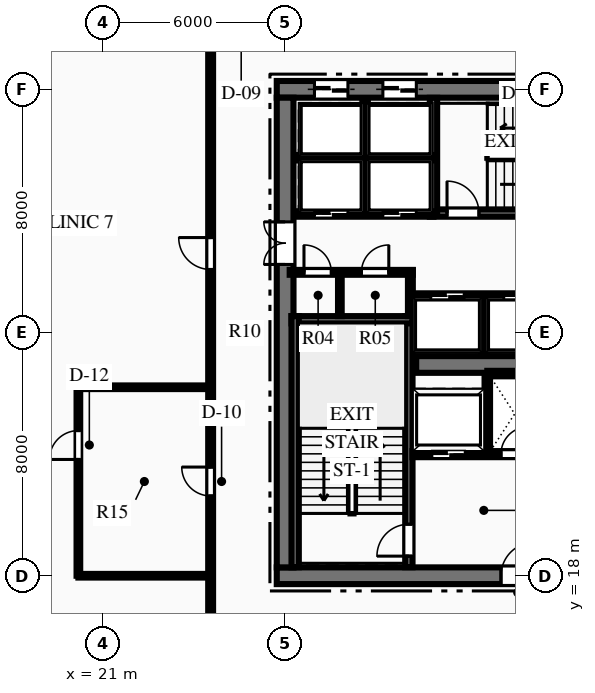
"""IFC4 building model, lengths in metres.
Left out: names, types, materials, properties, quantities, classifications, styles, units other than length and angle.
Written with IfcOpenShell. Run it as: python <this file> out.ifc"""

import sys

from ifc_helpers import new_model, si_unit, direction, frame, frame_2d, origin, place, context, subcontext, project, spatial, rectangle, extrude, element, fill, save


model = new_model("IFC4")
c1 = context("Model", 3, precision=1e-05, world=origin(), true_north=direction((0.0, 1.0)))
c2 = subcontext(c1, "Body", "Model", "MODEL_VIEW")
j1 = project(units=[si_unit("LENGTHUNIT", "METRE"), si_unit("PLANEANGLEUNIT", "RADIAN")], contexts=[c1])
p1 = place(None, origin())
s1 = spatial("IfcSite", under=j1, at=p1, CompositionType="ELEMENT")
p2 = place(p1, origin())
s2 = spatial("IfcBuilding", under=s1, at=p2, CompositionType="ELEMENT")
p3 = place(p2, frame((0.0, 0.0, 90.45)))
s3 = spatial("IfcBuildingStorey", under=s2, at=p3, CompositionType="ELEMENT", Elevation=90.45)
p4 = place(p3, frame((26.725, 18.0, 0.0), z_axis=(0.0, 0.0, 1.0), x_axis=(1.0, 0.0, 0.0)))
e1 = element("IfcWall", 1, at=p4, inside=s3, PredefinedType="SHEAR", context=c2, shape_type="SweptSolid", body=[
    extrude(rectangle(XDim=18.55, YDim=0.55, at=frame_2d((9.275, 0.0))), origin(), (0.0, 0.0, 1.0), 3.75),
])
p5 = place(p4, frame((7.375, 0.0, 0.0)))
e2 = element("IfcOpeningElement", 2, at=p5, cuts=e1, PredefinedType="OPENING", context=c2, shape_type="SweptSolid", body=[
    extrude(rectangle(XDim=1.1, YDim=2.15, at=frame_2d((0.55, 1.075))), frame((0.0, 0.285, 0.0), z_axis=(0.0, -1.0, 0.0), x_axis=(1.0, 0.0, 0.0)), (0.0, 0.0, 1.0), 0.57),
])
p6 = place(p4, frame((10.075, 0.0, 0.0)))
e3 = element("IfcOpeningElement", 3, at=p6, cuts=e1, PredefinedType="OPENING", context=c2, shape_type="SweptSolid", body=[
    extrude(rectangle(XDim=1.1, YDim=2.15, at=frame_2d((0.55, 1.075))), frame((0.0, 0.285, 0.0), z_axis=(0.0, -1.0, 0.0), x_axis=(1.0, 0.0, 0.0)), (0.0, 0.0, 1.0), 0.57),
])
p7 = place(p3, frame((26.725, 34.0, 0.0), z_axis=(0.0, 0.0, 1.0), x_axis=(1.0, 0.0, 0.0)))
e4 = element("IfcWall", 4, at=p7, inside=s3, PredefinedType="SHEAR", context=c2, shape_type="SweptSolid", body=[
    extrude(rectangle(XDim=18.55, YDim=0.55, at=frame_2d((9.275, 0.0))), origin(), (0.0, 0.0, 1.0), 3.75),
])
p8 = place(p7, frame((1.24, 0.0, 0.0)))
e5 = element("IfcOpeningElement", 5, at=p8, cuts=e4, PredefinedType="OPENING", context=c2, shape_type="SweptSolid", body=[
    extrude(rectangle(XDim=1.1, YDim=2.15, at=frame_2d((0.55, 1.075))), frame((0.0, 0.285, 0.0), z_axis=(0.0, -1.0, 0.0), x_axis=(1.0, 0.0, 0.0)), (0.0, 0.0, 1.0), 0.57),
])
p9 = place(p7, frame((3.49, 0.0, 0.0)))
e6 = element("IfcOpeningElement", 6, at=p9, cuts=e4, PredefinedType="OPENING", context=c2, shape_type="SweptSolid", body=[
    extrude(rectangle(XDim=1.1, YDim=2.15, at=frame_2d((0.55, 1.075))), frame((0.0, 0.285, 0.0), z_axis=(0.0, -1.0, 0.0), x_axis=(1.0, 0.0, 0.0)), (0.0, 0.0, 1.0), 0.57),
])
p10 = place(p7, frame((13.96, 0.0, 0.0)))
e7 = element("IfcOpeningElement", 7, at=p10, cuts=e4, PredefinedType="OPENING", context=c2, shape_type="SweptSolid", body=[
    extrude(rectangle(XDim=1.1, YDim=2.15, at=frame_2d((0.55, 1.075))), frame((0.0, 0.285, 0.0), z_axis=(0.0, -1.0, 0.0), x_axis=(1.0, 0.0, 0.0)), (0.0, 0.0, 1.0), 0.57),
])
p11 = place(p7, frame((16.21, 0.0, 0.0)))
e8 = element("IfcOpeningElement", 8, at=p11, cuts=e4, PredefinedType="OPENING", context=c2, shape_type="SweptSolid", body=[
    extrude(rectangle(XDim=1.1, YDim=2.15, at=frame_2d((0.55, 1.075))), frame((0.0, 0.285, 0.0), z_axis=(0.0, -1.0, 0.0), x_axis=(1.0, 0.0, 0.0)), (0.0, 0.0, 1.0), 0.57),
])
p12 = place(p3, frame((27.0, 18.275, 0.0), z_axis=(0.0, 0.0, 1.0), x_axis=(0.0, 1.0, 0.0)))
e9 = element("IfcWall", 9, at=p12, inside=s3, PredefinedType="SHEAR", context=c2, shape_type="SweptSolid", body=[
    extrude(rectangle(XDim=15.45, YDim=0.55, at=frame_2d((7.725, 0.0))), origin(), (0.0, 0.0, 1.0), 3.75),
])
p13 = place(p12, frame((9.965, 0.0, 0.0)))
e10 = element("IfcOpeningElement", 10, at=p13, cuts=e9, PredefinedType="OPENING", context=c2, shape_type="SweptSolid", body=[
    extrude(rectangle(XDim=1.4, YDim=2.2, at=frame_2d((0.7, 1.1))), frame((0.0, 0.285, 0.0), z_axis=(0.0, -1.0, 0.0), x_axis=(1.0, 0.0, 0.0)), (0.0, 0.0, 1.0), 0.57),
])
p14 = place(p3, frame((31.31, 24.95, 0.0), z_axis=(0.0, 0.0, 1.0), x_axis=(1.0, 0.0, 0.0)))
e11 = element("IfcWall", 11, at=p14, inside=s3, PredefinedType="SHEAR", context=c2, shape_type="SweptSolid", body=[
    extrude(rectangle(XDim=9.38, YDim=0.55, at=frame_2d((4.69, 0.0))), origin(), (0.0, 0.0, 1.0), 3.75),
])
p15 = place(p3, frame((31.07, 18.28, 0.0), z_axis=(0.0, 0.0, 1.0), x_axis=(0.0, 1.0, 0.0)))
e12 = element("IfcWall", 12, at=p15, inside=s3, PredefinedType="SHEAR", context=c2, shape_type="SweptSolid", body=[
    extrude(rectangle(XDim=8.26, YDim=0.24, at=frame_2d((4.13, 0.0))), origin(), (0.0, 0.0, 1.0), 3.75),
])
p16 = place(p15, frame((0.365, 0.0, 0.0)))
e13 = element("IfcOpeningElement", 13, at=p16, cuts=e12, PredefinedType="OPENING", context=c2, shape_type="SweptSolid", body=[
    extrude(rectangle(XDim=1.05, YDim=2.15, at=frame_2d((0.525, 1.075))), frame((0.0, 0.13, 0.0), z_axis=(0.0, -1.0, 0.0), x_axis=(1.0, 0.0, 0.0)), (0.0, 0.0, 1.0), 0.26),
])
p17 = place(p3, frame((27.21, 26.42, 0.0), z_axis=(0.0, 0.0, 1.0), x_axis=(1.0, 0.0, 0.0)))
e14 = element("IfcWall", 14, at=p17, inside=s3, PredefinedType="SHEAR", context=c2, shape_type="SweptSolid", body=[
    extrude(rectangle(XDim=3.98, YDim=0.24, at=frame_2d((1.99, 0.0))), origin(), (0.0, 0.0, 1.0), 3.75),
])
p18 = place(p3, frame((27.33, 18.28, 0.0), z_axis=(0.0, 0.0, 1.0), x_axis=(0.0, 1.0, 0.0)))
e15 = element("IfcWall", 15, at=p18, inside=s3, PredefinedType="SHEAR", context=c2, shape_type="SweptSolid", body=[
    extrude(rectangle(XDim=8.26, YDim=0.24, at=frame_2d((4.13, 0.0))), origin(), (0.0, 0.0, 1.0), 3.75),
])
p19 = place(p3, frame((31.76, 29.93, 0.0), z_axis=(0.0, 0.0, 1.0), x_axis=(1.0, 0.0, 0.0)))
e16 = element("IfcWall", 16, at=p19, inside=s3, PredefinedType="SHEAR", context=c2, shape_type="SweptSolid", body=[
    extrude(rectangle(XDim=8.38, YDim=0.24, at=frame_2d((4.19, 0.0))), origin(), (0.0, 0.0, 1.0), 3.75),
])
p20 = place(p19, frame((0.565, 0.0, 0.0)))
e17 = element("IfcOpeningElement", 17, at=p20, cuts=e16, PredefinedType="OPENING", context=c2, shape_type="SweptSolid", body=[
    extrude(rectangle(XDim=1.05, YDim=2.15, at=frame_2d((0.525, 1.075))), frame((0.0, 0.13, 0.0), z_axis=(0.0, -1.0, 0.0), x_axis=(1.0, 0.0, 0.0)), (0.0, 0.0, 1.0), 0.26),
])
p21 = place(p3, frame((31.88, 29.93, 0.0), z_axis=(0.0, 0.0, 1.0), x_axis=(0.0, 1.0, 0.0)))
e18 = element("IfcWall", 18, at=p21, inside=s3, PredefinedType="SHEAR", context=c2, shape_type="SweptSolid", body=[
    extrude(rectangle(XDim=3.79, YDim=0.24, at=frame_2d((1.895, 0.0))), origin(), (0.0, 0.0, 1.0), 3.75),
])
p22 = place(p3, frame((31.19, 22.0, 0.0), z_axis=(0.0, 0.0, 1.0), x_axis=(1.0, 0.0, 0.0)))
e19 = element("IfcWall", 19, at=p22, inside=s3, PredefinedType="PARTITIONING", context=c2, shape_type="SweptSolid", body=[
    extrude(rectangle(XDim=4.69, YDim=0.2, at=frame_2d((2.345, 0.0))), origin(), (0.0, 0.0, 1.0), 3.45),
])
p23 = place(p22, frame((2.91, 0.0, 0.0)))
e20 = element("IfcOpeningElement", 20, at=p23, cuts=e19, PredefinedType="OPENING", context=c2, shape_type="SweptSolid", body=[
    extrude(rectangle(XDim=0.9, YDim=2.15, at=frame_2d((0.45, 1.075))), frame((0.0, 0.11, 0.0), z_axis=(0.0, -1.0, 0.0), x_axis=(1.0, 0.0, 0.0)), (0.0, 0.0, 1.0), 0.22),
])
p24 = place(p22, frame((0.635, 0.0, 0.0)))
e21 = element("IfcOpeningElement", 21, at=p24, cuts=e19, PredefinedType="OPENING", context=c2, shape_type="SweptSolid", body=[
    extrude(rectangle(XDim=1.1, YDim=2.15, at=frame_2d((0.55, 1.075))), frame((0.0, 0.11, 0.0), z_axis=(0.0, -1.0, 0.0), x_axis=(1.0, 0.0, 0.0)), (0.0, 0.0, 1.0), 0.22),
])
p25 = place(p3, frame((33.65, 22.05, 0.0), z_axis=(0.0, 0.0, 1.0), x_axis=(0.0, 1.0, 0.0)))
e22 = element("IfcWall", 22, at=p25, inside=s3, PredefinedType="PARTITIONING", context=c2, shape_type="SweptSolid", body=[
    extrude(rectangle(XDim=2.6, YDim=0.18, at=frame_2d((1.3, 0.0))), origin(), (0.0, 0.0, 1.0), 3.45),
])
p26 = place(p3, frame((33.65, 24.65, 0.0), z_axis=(0.0, 0.0, 1.0), x_axis=(1.0, 0.0, 0.0)))
e23 = element("IfcWall", 23, at=p26, inside=s3, PredefinedType="PARTITIONING", context=c2, shape_type="SweptSolid", body=[
    extrude(rectangle(XDim=1.8, YDim=0.18, at=frame_2d((0.9, 0.0))), origin(), (0.0, 0.0, 1.0), 3.45),
])
p27 = place(p3, frame((27.15, 27.98, 0.0), z_axis=(0.0, 0.0, 1.0), x_axis=(1.0, 0.0, 0.0)))
e24 = element("IfcWall", 24, at=p27, inside=s3, PredefinedType="PARTITIONING", context=c2, shape_type="SweptSolid", body=[
    extrude(rectangle(XDim=4.05, YDim=0.16, at=frame_2d((2.025, 0.0))), origin(), (0.0, 0.0, 1.0), 3.45),
])
p28 = place(p27, frame((0.47, 0.0, 0.0)))
e25 = element("IfcOpeningElement", 25, at=p28, cuts=e24, PredefinedType="OPENING", context=c2, shape_type="SweptSolid", body=[
    extrude(rectangle(XDim=0.9, YDim=2.15, at=frame_2d((0.45, 1.075))), frame((0.0, 0.09, 0.0), z_axis=(0.0, -1.0, 0.0), x_axis=(1.0, 0.0, 0.0)), (0.0, 0.0, 1.0), 0.18),
])
p29 = place(p27, frame((2.36, 0.0, 0.0)))
e26 = element("IfcOpeningElement", 26, at=p29, cuts=e24, PredefinedType="OPENING", context=c2, shape_type="SweptSolid", body=[
    extrude(rectangle(XDim=0.9, YDim=2.15, at=frame_2d((0.45, 1.075))), frame((0.0, 0.09, 0.0), z_axis=(0.0, -1.0, 0.0), x_axis=(1.0, 0.0, 0.0)), (0.0, 0.0, 1.0), 0.18),
])
p30 = place(p3, frame((31.12, 26.54, 0.0), z_axis=(0.0, 0.0, 1.0), x_axis=(0.0, 1.0, 0.0)))
e27 = element("IfcWall", 27, at=p30, inside=s3, PredefinedType="PARTITIONING", context=c2, shape_type="SweptSolid", body=[
    extrude(rectangle(XDim=1.51, YDim=0.16, at=frame_2d((0.755, 0.0))), origin(), (0.0, 0.0, 1.0), 3.45),
])
p31 = place(p3, frame((28.8, 26.54, 0.0), z_axis=(0.0, 0.0, 1.0), x_axis=(0.0, 1.0, 0.0)))
e28 = element("IfcWall", 28, at=p31, inside=s3, PredefinedType="PARTITIONING", context=c2, shape_type="SweptSolid", body=[
    extrude(rectangle(XDim=1.44, YDim=0.12, at=frame_2d((0.72, 0.0))), origin(), (0.0, 0.0, 1.0), 3.45),
])
p32 = place(p3, frame((27.45, 29.9, 0.0), z_axis=(0.0, 0.0, 1.0), x_axis=(1.0, 0.0, 0.0)))
e29 = element("IfcWall", 29, at=p32, inside=s3, PredefinedType="PARTITIONING", context=c2, shape_type="SweptSolid", body=[
    extrude(rectangle(XDim=4.43, YDim=0.18, at=frame_2d((2.215, 0.0))), origin(), (0.0, 0.0, 1.0), 3.45),
])
p33 = place(p32, frame((0.515, 0.0, 0.0)))
e30 = element("IfcOpeningElement", 30, at=p33, cuts=e29, PredefinedType="OPENING", context=c2, shape_type="SweptSolid", body=[
    extrude(rectangle(XDim=1.1, YDim=2.15, at=frame_2d((0.55, 1.075))), frame((0.0, 0.1, 0.0), z_axis=(0.0, -1.0, 0.0), x_axis=(1.0, 0.0, 0.0)), (0.0, 0.0, 1.0), 0.2),
])
p34 = place(p32, frame((2.765, 0.0, 0.0)))
e31 = element("IfcOpeningElement", 31, at=p34, cuts=e29, PredefinedType="OPENING", context=c2, shape_type="SweptSolid", body=[
    extrude(rectangle(XDim=1.1, YDim=2.15, at=frame_2d((0.55, 1.075))), frame((0.0, 0.1, 0.0), z_axis=(0.0, -1.0, 0.0), x_axis=(1.0, 0.0, 0.0)), (0.0, 0.0, 1.0), 0.2),
])
p35 = place(p3, frame((27.45, 31.75, 0.0), z_axis=(0.0, 0.0, 1.0), x_axis=(1.0, 0.0, 0.0)))
e32 = element("IfcWall", 32, at=p35, inside=s3, PredefinedType="PARTITIONING", context=c2, shape_type="SweptSolid", body=[
    extrude(rectangle(XDim=4.43, YDim=0.18, at=frame_2d((2.215, 0.0))), origin(), (0.0, 0.0, 1.0), 3.45),
])
p36 = place(p3, frame((29.63, 29.9, 0.0), z_axis=(0.0, 0.0, 1.0), x_axis=(0.0, 1.0, 0.0)))
e33 = element("IfcWall", 33, at=p36, inside=s3, PredefinedType="PARTITIONING", context=c2, shape_type="SweptSolid", body=[
    extrude(rectangle(XDim=3.75, YDim=0.18, at=frame_2d((1.875, 0.0))), origin(), (0.0, 0.0, 1.0), 3.45),
])
p37 = place(p3, frame((31.2, 27.2, 0.0), z_axis=(0.0, 0.0, 1.0), x_axis=(1.0, 0.0, 0.0)))
e34 = element("IfcWall", 34, at=p37, inside=s3, PredefinedType="PARTITIONING", context=c2, shape_type="SweptSolid", body=[
    extrude(rectangle(XDim=9.6, YDim=0.18, at=frame_2d((4.8, 0.0))), origin(), (0.0, 0.0, 1.0), 3.45),
])
p38 = place(p37, frame((0.59, 0.0, 0.0)))
e35 = element("IfcOpeningElement", 35, at=p38, cuts=e34, PredefinedType="OPENING", context=c2, shape_type="SweptSolid", body=[
    extrude(rectangle(XDim=1.1, YDim=2.15, at=frame_2d((0.55, 1.075))), frame((0.0, 0.1, 0.0), z_axis=(0.0, -1.0, 0.0), x_axis=(1.0, 0.0, 0.0)), (0.0, 0.0, 1.0), 0.2),
])
p39 = place(p37, frame((2.99, 0.0, 0.0)))
e36 = element("IfcOpeningElement", 36, at=p39, cuts=e34, PredefinedType="OPENING", context=c2, shape_type="SweptSolid", body=[
    extrude(rectangle(XDim=1.1, YDim=2.15, at=frame_2d((0.55, 1.075))), frame((0.0, 0.1, 0.0), z_axis=(0.0, -1.0, 0.0), x_axis=(1.0, 0.0, 0.0)), (0.0, 0.0, 1.0), 0.2),
])
p40 = place(p37, frame((5.51, 0.0, 0.0)))
e37 = element("IfcOpeningElement", 37, at=p40, cuts=e34, PredefinedType="OPENING", context=c2, shape_type="SweptSolid", body=[
    extrude(rectangle(XDim=1.1, YDim=2.15, at=frame_2d((0.55, 1.075))), frame((0.0, 0.1, 0.0), z_axis=(0.0, -1.0, 0.0), x_axis=(1.0, 0.0, 0.0)), (0.0, 0.0, 1.0), 0.2),
])
p41 = place(p37, frame((7.91, 0.0, 0.0)))
e38 = element("IfcOpeningElement", 38, at=p41, cuts=e34, PredefinedType="OPENING", context=c2, shape_type="SweptSolid", body=[
    extrude(rectangle(XDim=1.1, YDim=2.15, at=frame_2d((0.55, 1.075))), frame((0.0, 0.1, 0.0), z_axis=(0.0, -1.0, 0.0), x_axis=(1.0, 0.0, 0.0)), (0.0, 0.0, 1.0), 0.2),
])
p42 = place(p3, frame((33.54, 25.3, 0.0), z_axis=(0.0, 0.0, 1.0), x_axis=(0.0, 1.0, 0.0)))
e39 = element("IfcWall", 39, at=p42, inside=s3, PredefinedType="PARTITIONING", context=c2, shape_type="SweptSolid", body=[
    extrude(rectangle(XDim=1.9, YDim=0.18, at=frame_2d((0.95, 0.0))), origin(), (0.0, 0.0, 1.0), 3.45),
])
p43 = place(p3, frame((24.55, 15.55, 0.0), z_axis=(0.0, 0.0, 1.0), x_axis=(0.0, 1.0, 0.0)))
e40 = element("IfcWall", 40, at=p43, inside=s3, PredefinedType="PARTITIONING", context=c2, shape_type="SweptSolid", body=[
    extrude(rectangle(XDim=20.9, YDim=0.16, at=frame_2d((10.45, 0.0))), origin(), (0.0, 0.0, 1.0), 3.45),
])
p44 = place(p43, frame((5.075, 0.0, 0.0)))
e41 = element("IfcOpeningElement", 41, at=p44, cuts=e40, PredefinedType="OPENING", context=c2, shape_type="SweptSolid", body=[
    extrude(rectangle(XDim=0.95, YDim=2.15, at=frame_2d((0.475, 1.075))), frame((0.0, 0.09, 0.0), z_axis=(0.0, -1.0, 0.0), x_axis=(1.0, 0.0, 0.0)), (0.0, 0.0, 1.0), 0.18),
])
p45 = place(p43, frame((12.524, 0.0, 0.0)))
e42 = element("IfcOpeningElement", 42, at=p45, cuts=e40, PredefinedType="OPENING", context=c2, shape_type="SweptSolid", body=[
    extrude(rectangle(XDim=1.05, YDim=2.15, at=frame_2d((0.525, 1.075))), frame((0.0, 0.09, 0.0), z_axis=(0.0, -1.0, 0.0), x_axis=(1.0, 0.0, 0.0)), (0.0, 0.0, 1.0), 0.18),
])
p46 = place(p3, frame((20.2, 18.0, 0.0), z_axis=(0.0, 0.0, 1.0), x_axis=(1.0, 0.0, 0.0)))
e43 = element("IfcWall", 43, at=p46, inside=s3, PredefinedType="PARTITIONING", context=c2, shape_type="SweptSolid", body=[
    extrude(rectangle(XDim=4.35, YDim=0.12, at=frame_2d((2.175, 0.0))), origin(), (0.0, 0.0, 1.0), 2.749),
])
p47 = place(p3, frame((20.2, 18.0, 0.0), z_axis=(0.0, 0.0, 1.0), x_axis=(0.0, 1.0, 0.0)))
e44 = element("IfcWall", 44, at=p47, inside=s3, PredefinedType="PARTITIONING", context=c2, shape_type="SweptSolid", body=[
    extrude(rectangle(XDim=6.2, YDim=0.12, at=frame_2d((3.1, 0.0))), origin(), (0.0, 0.0, 1.0), 3.45),
])
p48 = place(p47, frame((3.825, 0.0, 0.0)))
e45 = element("IfcOpeningElement", 45, at=p48, cuts=e44, PredefinedType="OPENING", context=c2, shape_type="SweptSolid", body=[
    extrude(rectangle(XDim=0.95, YDim=2.15, at=frame_2d((0.475, 1.075))), frame((0.0, 0.07, 0.0), z_axis=(0.0, -1.0, 0.0), x_axis=(1.0, 0.0, 0.0)), (0.0, 0.0, 1.0), 0.14),
])
p49 = place(p3, frame((20.2, 24.2, 0.0), z_axis=(0.0, 0.0, 1.0), x_axis=(1.0, 0.0, 0.0)))
e46 = element("IfcWall", 46, at=p49, inside=s3, PredefinedType="PARTITIONING", context=c2, shape_type="SweptSolid", body=[
    extrude(rectangle(XDim=4.35, YDim=0.12, at=frame_2d((2.175, 0.0))), origin(), (0.0, 0.0, 1.0), 3.45),
])
p50 = place(p28, origin())
e47 = element("IfcDoor", 47, at=p50, inside=s3, OperationType="SINGLE_SWING_LEFT", PredefinedType="DOOR", context=c2, shape_type="SweptSolid", body=[
    extrude(rectangle(XDim=0.9, YDim=2.15, at=frame_2d((0.45, 1.075))), frame((0.0, 0.025, 0.0), z_axis=(0.0, -1.0, 0.0), x_axis=(1.0, 0.0, 0.0)), (0.0, 0.0, 1.0), 0.05),
])
fill(e25, e47)
p51 = place(p29, origin())
e48 = element("IfcDoor", 48, at=p51, inside=s3, OperationType="SINGLE_SWING_RIGHT", PredefinedType="DOOR", context=c2, shape_type="SweptSolid", body=[
    extrude(rectangle(XDim=0.9, YDim=2.15, at=frame_2d((0.45, 1.075))), frame((0.0, 0.025, 0.0), z_axis=(0.0, -1.0, 0.0), x_axis=(1.0, 0.0, 0.0)), (0.0, 0.0, 1.0), 0.05),
])
fill(e26, e48)
p52 = place(p16, origin())
e49 = element("IfcDoor", 49, at=p52, inside=s3, OperationType="SINGLE_SWING_LEFT", PredefinedType="DOOR", context=c2, shape_type="SweptSolid", body=[
    extrude(rectangle(XDim=1.05, YDim=2.15, at=frame_2d((0.525, 1.075))), frame((0.0, 0.025, 0.0), z_axis=(0.0, -1.0, 0.0), x_axis=(1.0, 0.0, 0.0)), (0.0, 0.0, 1.0), 0.05),
])
fill(e13, e49)
p53 = place(p20, origin())
e50 = element("IfcDoor", 50, at=p53, inside=s3, OperationType="SINGLE_SWING_LEFT", PredefinedType="DOOR", context=c2, shape_type="SweptSolid", body=[
    extrude(rectangle(XDim=1.05, YDim=2.15, at=frame_2d((0.525, 1.075))), frame((0.0, 0.025, 0.0), z_axis=(0.0, -1.0, 0.0), x_axis=(1.0, 0.0, 0.0)), (0.0, 0.0, 1.0), 0.05),
])
fill(e17, e50)
p54 = place(p5, origin())
e51 = element("IfcDoor", 51, at=p54, inside=s3, OperationType="SINGLE_SWING_RIGHT", PredefinedType="DOOR", context=c2, shape_type="SweptSolid", body=[
    extrude(rectangle(XDim=1.1, YDim=2.15, at=frame_2d((0.55, 1.075))), frame((0.0, 0.025, 0.0), z_axis=(0.0, -1.0, 0.0), x_axis=(1.0, 0.0, 0.0)), (0.0, 0.0, 1.0), 0.05),
])
fill(e2, e51)
p55 = place(p23, origin())
e52 = element("IfcDoor", 52, at=p55, inside=s3, OperationType="SINGLE_SWING_RIGHT", PredefinedType="DOOR", context=c2, shape_type="SweptSolid", body=[
    extrude(rectangle(XDim=0.9, YDim=2.15, at=frame_2d((0.45, 1.075))), frame((0.0, 0.025, 0.0), z_axis=(0.0, -1.0, 0.0), x_axis=(1.0, 0.0, 0.0)), (0.0, 0.0, 1.0), 0.05),
])
fill(e20, e52)
p56 = place(p13, origin())
e53 = element("IfcDoor", 53, at=p56, inside=s3, OperationType="DOUBLE_DOOR_SINGLE_SWING", PredefinedType="DOOR", context=c2, shape_type="SweptSolid", body=[
    extrude(rectangle(XDim=1.4, YDim=2.2, at=frame_2d((0.7, 1.1))), frame((0.0, 0.025, 0.0), z_axis=(0.0, -1.0, 0.0), x_axis=(1.0, 0.0, 0.0)), (0.0, 0.0, 1.0), 0.05),
])
fill(e10, e53)
p57 = place(p44, origin())
e54 = element("IfcDoor", 54, at=p57, inside=s3, OperationType="SINGLE_SWING_RIGHT", PredefinedType="DOOR", context=c2, shape_type="SweptSolid", body=[
    extrude(rectangle(XDim=0.95, YDim=2.15, at=frame_2d((0.475, 1.075))), frame((0.0, 0.025, 0.0), z_axis=(0.0, -1.0, 0.0), x_axis=(1.0, 0.0, 0.0)), (0.0, 0.0, 1.0), 0.05),
])
fill(e41, e54)
p58 = place(p48, origin())
e55 = element("IfcDoor", 55, at=p58, inside=s3, OperationType="SINGLE_SWING_LEFT", PredefinedType="DOOR", context=c2, shape_type="SweptSolid", body=[
    extrude(rectangle(XDim=0.95, YDim=2.15, at=frame_2d((0.475, 1.075))), frame((0.0, 0.025, 0.0), z_axis=(0.0, -1.0, 0.0), x_axis=(1.0, 0.0, 0.0)), (0.0, 0.0, 1.0), 0.05),
])
fill(e45, e55)
p59 = place(p45, origin())
e56 = element("IfcDoor", 56, at=p59, inside=s3, OperationType="SINGLE_SWING_RIGHT", PredefinedType="DOOR", context=c2, shape_type="SweptSolid", body=[
    extrude(rectangle(XDim=1.05, YDim=2.15, at=frame_2d((0.525, 1.075))), frame((0.0, 0.025, 0.0), z_axis=(0.0, -1.0, 0.0), x_axis=(1.0, 0.0, 0.0)), (0.0, 0.0, 1.0), 0.05),
])
fill(e42, e56)
p60 = place(p33, origin())
e57 = element("IfcDoor", 57, at=p60, inside=s3, OperationType="SLIDING_TO_LEFT", PredefinedType="DOOR", context=c2, shape_type="SweptSolid", body=[
    extrude(rectangle(XDim=1.1, YDim=2.15, at=frame_2d((0.55, 1.075))), frame((0.0, 0.025, 0.0), z_axis=(0.0, -1.0, 0.0), x_axis=(1.0, 0.0, 0.0)), (0.0, 0.0, 1.0), 0.05),
])
fill(e30, e57)
p61 = place(p34, origin())
e58 = element("IfcDoor", 58, at=p61, inside=s3, OperationType="SLIDING_TO_LEFT", PredefinedType="DOOR", context=c2, shape_type="SweptSolid", body=[
    extrude(rectangle(XDim=1.1, YDim=2.15, at=frame_2d((0.55, 1.075))), frame((0.0, 0.025, 0.0), z_axis=(0.0, -1.0, 0.0), x_axis=(1.0, 0.0, 0.0)), (0.0, 0.0, 1.0), 0.05),
])
fill(e31, e58)
p62 = place(p8, origin())
e59 = element("IfcDoor", 59, at=p62, inside=s3, OperationType="SLIDING_TO_LEFT", PredefinedType="DOOR", context=c2, shape_type="SweptSolid", body=[
    extrude(rectangle(XDim=1.1, YDim=2.15, at=frame_2d((0.55, 1.075))), frame((0.0, 0.025, 0.0), z_axis=(0.0, -1.0, 0.0), x_axis=(1.0, 0.0, 0.0)), (0.0, 0.0, 1.0), 0.05),
])
fill(e5, e59)
p63 = place(p9, origin())
e60 = element("IfcDoor", 60, at=p63, inside=s3, OperationType="SLIDING_TO_LEFT", PredefinedType="DOOR", context=c2, shape_type="SweptSolid", body=[
    extrude(rectangle(XDim=1.1, YDim=2.15, at=frame_2d((0.55, 1.075))), frame((0.0, 0.025, 0.0), z_axis=(0.0, -1.0, 0.0), x_axis=(1.0, 0.0, 0.0)), (0.0, 0.0, 1.0), 0.05),
])
fill(e6, e60)
p64 = place(p38, origin())
e61 = element("IfcDoor", 61, at=p64, inside=s3, OperationType="SLIDING_TO_LEFT", PredefinedType="DOOR", context=c2, shape_type="SweptSolid", body=[
    extrude(rectangle(XDim=1.1, YDim=2.15, at=frame_2d((0.55, 1.075))), frame((0.0, 0.025, 0.0), z_axis=(0.0, -1.0, 0.0), x_axis=(1.0, 0.0, 0.0)), (0.0, 0.0, 1.0), 0.05),
])
fill(e35, e61)
p65 = place(p39, origin())
e62 = element("IfcDoor", 62, at=p65, inside=s3, OperationType="SLIDING_TO_LEFT", PredefinedType="DOOR", context=c2, shape_type="SweptSolid", body=[
    extrude(rectangle(XDim=1.1, YDim=2.15, at=frame_2d((0.55, 1.075))), frame((0.0, 0.025, 0.0), z_axis=(0.0, -1.0, 0.0), x_axis=(1.0, 0.0, 0.0)), (0.0, 0.0, 1.0), 0.05),
])
fill(e36, e62)
p66 = place(p24, origin())
e63 = element("IfcDoor", 63, at=p66, inside=s3, OperationType="SLIDING_TO_LEFT", PredefinedType="DOOR", context=c2, shape_type="SweptSolid", body=[
    extrude(rectangle(XDim=1.1, YDim=2.15, at=frame_2d((0.55, 1.075))), frame((0.0, 0.025, 0.0), z_axis=(0.0, -1.0, 0.0), x_axis=(1.0, 0.0, 0.0)), (0.0, 0.0, 1.0), 0.05),
])
fill(e21, e63)
save(model, sys.argv[1])
